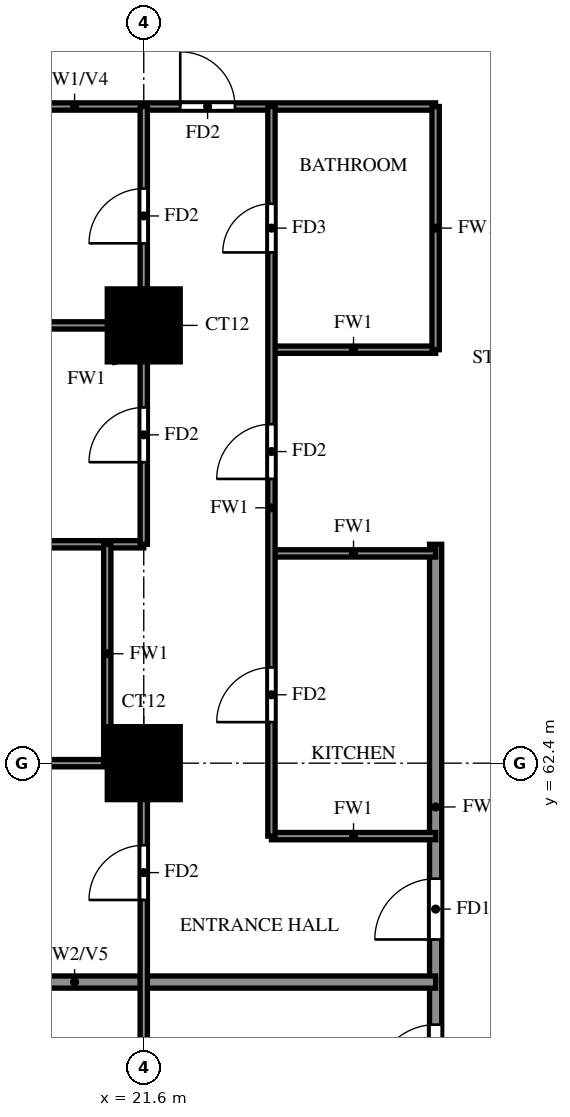
"""IFC4 building model, lengths in metres.
Left out: names, types, materials, properties, quantities, classifications, styles, units other than length and angle.
Written with IfcOpenShell. Run it as: python <this file> out.ifc"""

import sys

from ifc_helpers import new_model, si_unit, direction, frame, frame_2d, origin, origin_2d, place, context, subcontext, project, spatial, rectangle, extrude, source, transform, mapped, element, fill, save


model = new_model("IFC4")
c1 = context("Model", 3, precision=1e-05, world=origin(), true_north=direction((0.0, 1.0)))
c2 = subcontext(c1, "Body", "Model", "MODEL_VIEW")
j1 = project(units=[si_unit("LENGTHUNIT", "METRE"), si_unit("PLANEANGLEUNIT", "RADIAN")], contexts=[c1])
p1 = place(None, origin())
s1 = spatial("IfcSite", under=j1, at=p1, CompositionType="ELEMENT")
p2 = place(p1, origin())
s2 = spatial("IfcBuilding", under=s1, at=p2, CompositionType="ELEMENT")
p3 = place(p2, frame((0.0, 0.0, 93.5)))
s3 = spatial("IfcBuildingStorey", under=s2, at=p3, CompositionType="ELEMENT", Elevation=93.5)
m1 = source(origin(), c2, "Body", "SweptSolid", [
    extrude(rectangle(XDim=1.2, YDim=1.2, at=origin_2d()), origin(), (0.0, 0.0, 1.0), 3.18),
])
for number, where, z_axis, x_axis in (
    (1, (21.6, 62.4, 0.0), (0.0, 0.0, 1.0), (1.0, 0.0, 0.0)),
    (2, (21.6, 69.6, 0.0), (0.0, 0.0, 1.0), (1.0, 0.0, 0.0)),
):
    element("IfcColumn", number, at=place(p3, frame(where, z_axis=z_axis, x_axis=x_axis)), inside=s3, PredefinedType="COLUMN", context=c2, shape_type="MappedRepresentation", body=[
        mapped(m1, transform((0.0, 0.0, 0.0))),
    ])
p4 = place(p3, frame((26.4, 56.4, 0.0), z_axis=(0.0, 0.0, 1.0), x_axis=(0.0, 1.0, 0.0)))
e3 = element("IfcWall", 3, at=p4, inside=s3, PredefinedType="SOLIDWALL", context=c2, shape_type="SweptSolid", body=[
    extrude(rectangle(XDim=9.6, YDim=0.2, at=frame_2d((4.8, 0.0))), origin(), (0.0, 0.0, 1.0), 3.18),
])
p5 = place(p4, frame((0.7, 0.0, 0.0)))
e4 = element("IfcOpeningElement", 4, at=p5, cuts=e3, PredefinedType="OPENING", context=c2, shape_type="SweptSolid", body=[
    extrude(rectangle(XDim=1.0, YDim=2.1, at=frame_2d((0.5, 1.05))), frame((0.0, 0.11, 0.0), z_axis=(0.0, -1.0, 0.0), x_axis=(1.0, 0.0, 0.0)), (0.0, 0.0, 1.0), 0.22),
])
p6 = place(p4, frame((3.1, 0.0, 0.0)))
e5 = element("IfcOpeningElement", 5, at=p6, cuts=e3, PredefinedType="OPENING", context=c2, shape_type="SweptSolid", body=[
    extrude(rectangle(XDim=1.0, YDim=2.1, at=frame_2d((0.5, 1.05))), frame((0.0, 0.11, 0.0), z_axis=(0.0, -1.0, 0.0), x_axis=(1.0, 0.0, 0.0)), (0.0, 0.0, 1.0), 0.22),
])
p7 = place(p3, frame((14.525, 58.8, 0.0), z_axis=(0.0, 0.0, 1.0), x_axis=(1.0, 0.0, 0.0)))
e6 = element("IfcWall", 6, at=p7, inside=s3, PredefinedType="SOLIDWALL", context=c2, shape_type="SweptSolid", body=[
    extrude(rectangle(XDim=11.875, YDim=0.2, at=frame_2d((5.938, 0.0))), origin(), (0.0, 0.0, 1.0), 2.28),
])
p8 = place(p3, frame((23.7, 61.2, 0.0), z_axis=(0.0, 0.0, 1.0), x_axis=(1.0, 0.0, 0.0)))
e7 = element("IfcWall", 7, at=p8, inside=s3, PredefinedType="PARTITIONING", context=c2, shape_type="SweptSolid", body=[
    extrude(rectangle(XDim=2.7, YDim=0.12, at=frame_2d((1.35, 0.0))), origin(), (0.0, 0.0, 1.0), 3.18),
])
p9 = place(p3, frame((14.525, 62.4, 0.0), z_axis=(0.0, 0.0, 1.0), x_axis=(1.0, 0.0, 0.0)))
e8 = element("IfcWall", 8, at=p9, inside=s3, PredefinedType="PARTITIONING", context=c2, shape_type="SweptSolid", body=[
    extrude(rectangle(XDim=7.075, YDim=0.12, at=frame_2d((3.538, 0.0))), origin(), (0.0, 0.0, 1.0), 3.18),
])
p10 = place(p9, frame((2.837, 0.0, 0.0)))
e9 = element("IfcOpeningElement", 9, at=p10, cuts=e8, PredefinedType="OPENING", context=c2, shape_type="SweptSolid", body=[
    extrude(rectangle(XDim=0.8, YDim=2.1, at=frame_2d((0.4, 1.05))), frame((0.0, 0.07, 0.0), z_axis=(0.0, -1.0, 0.0), x_axis=(1.0, 0.0, 0.0)), (0.0, 0.0, 1.0), 0.14),
])
p11 = place(p3, frame((23.7, 65.85, 0.0), z_axis=(0.0, 0.0, 1.0), x_axis=(1.0, 0.0, 0.0)))
e10 = element("IfcWall", 10, at=p11, inside=s3, PredefinedType="PARTITIONING", context=c2, shape_type="SweptSolid", body=[
    extrude(rectangle(XDim=2.7, YDim=0.12, at=frame_2d((1.35, 0.0))), origin(), (0.0, 0.0, 1.0), 3.18),
])
p12 = place(p3, frame((14.525, 66.0, 0.0), z_axis=(0.0, 0.0, 1.0), x_axis=(1.0, 0.0, 0.0)))
e11 = element("IfcWall", 11, at=p12, inside=s3, PredefinedType="PARTITIONING", context=c2, shape_type="SweptSolid", body=[
    extrude(rectangle(XDim=7.075, YDim=0.12, at=frame_2d((3.538, 0.0))), origin(), (0.0, 0.0, 1.0), 2.28),
])
p13 = place(p3, frame((23.7, 69.2, 0.0), z_axis=(0.0, 0.0, 1.0), x_axis=(1.0, 0.0, 0.0)))
e12 = element("IfcWall", 12, at=p13, inside=s3, PredefinedType="PARTITIONING", context=c2, shape_type="SweptSolid", body=[
    extrude(rectangle(XDim=2.7, YDim=0.12, at=frame_2d((1.35, 0.0))), origin(), (0.0, 0.0, 1.0), 3.18),
])
p14 = place(p3, frame((14.525, 69.6, 0.0), z_axis=(0.0, 0.0, 1.0), x_axis=(1.0, 0.0, 0.0)))
e13 = element("IfcWall", 13, at=p14, inside=s3, PredefinedType="PARTITIONING", context=c2, shape_type="SweptSolid", body=[
    extrude(rectangle(XDim=7.075, YDim=0.12, at=frame_2d((3.538, 0.0))), origin(), (0.0, 0.0, 1.0), 3.18),
])
p15 = place(p3, frame((14.525, 73.2, 0.0), z_axis=(0.0, 0.0, 1.0), x_axis=(1.0, 0.0, 0.0)))
e14 = element("IfcWall", 14, at=p15, inside=s3, PredefinedType="PARTITIONING", context=c2, shape_type="SweptSolid", body=[
    extrude(rectangle(XDim=11.875, YDim=0.12, at=frame_2d((5.938, 0.0))), origin(), (0.0, 0.0, 1.0), 2.28),
])
p16 = place(p15, frame((7.675, 0.0, 0.0)))
e15 = element("IfcOpeningElement", 15, at=p16, cuts=e14, PredefinedType="OPENING", context=c2, shape_type="SweptSolid", body=[
    extrude(rectangle(XDim=0.9, YDim=2.1, at=frame_2d((0.45, 1.05))), frame((0.0, 0.07, 0.0), z_axis=(0.0, -1.0, 0.0), x_axis=(1.0, 0.0, 0.0)), (0.0, 0.0, 1.0), 0.14),
])
p17 = place(p3, frame((21.0, 62.4, 0.0), z_axis=(0.0, 0.0, 1.0), x_axis=(0.0, 1.0, 0.0)))
e16 = element("IfcWall", 16, at=p17, inside=s3, PredefinedType="PARTITIONING", context=c2, shape_type="SweptSolid", body=[
    extrude(rectangle(XDim=3.6, YDim=0.12, at=frame_2d((1.8, 0.0))), origin(), (0.0, 0.0, 1.0), 3.18),
])
p18 = place(p3, frame((21.6, 33.725, 0.0), z_axis=(0.0, 0.0, 1.0), x_axis=(0.0, 1.0, 0.0)))
e17 = element("IfcWall", 17, at=p18, inside=s3, PredefinedType="PARTITIONING", context=c2, shape_type="SweptSolid", body=[
    extrude(rectangle(XDim=28.675, YDim=0.12, at=frame_2d((14.337, 0.0))), origin(), (0.0, 0.0, 1.0), 3.18),
])
p19 = place(p18, frame((7.775, 0.0, 0.0)))
e18 = element("IfcOpeningElement", 18, at=p19, cuts=e17, PredefinedType="OPENING", context=c2, shape_type="SweptSolid", body=[
    extrude(rectangle(XDim=0.9, YDim=2.1, at=frame_2d((0.45, 1.05))), frame((0.0, 0.07, 0.0), z_axis=(0.0, -1.0, 0.0), x_axis=(1.0, 0.0, 0.0)), (0.0, 0.0, 1.0), 0.14),
])
p20 = place(p18, frame((17.125, 0.0, 0.0)))
e19 = element("IfcOpeningElement", 19, at=p20, cuts=e17, PredefinedType="OPENING", context=c2, shape_type="SweptSolid", body=[
    extrude(rectangle(XDim=1.5, YDim=2.1, at=frame_2d((0.75, 1.05))), frame((0.0, 0.07, 0.0), z_axis=(0.0, -1.0, 0.0), x_axis=(1.0, 0.0, 0.0)), (0.0, 0.0, 1.0), 0.14),
])
p21 = place(p18, frame((22.825, 0.0, 0.0)))
e20 = element("IfcOpeningElement", 20, at=p21, cuts=e17, PredefinedType="OPENING", context=c2, shape_type="SweptSolid", body=[
    extrude(rectangle(XDim=0.9, YDim=2.1, at=frame_2d((0.45, 1.05))), frame((0.0, 0.07, 0.0), z_axis=(0.0, -1.0, 0.0), x_axis=(1.0, 0.0, 0.0)), (0.0, 0.0, 1.0), 0.14),
])
p22 = place(p18, frame((26.425, 0.0, 0.0)))
e21 = element("IfcOpeningElement", 21, at=p22, cuts=e17, PredefinedType="OPENING", context=c2, shape_type="SweptSolid", body=[
    extrude(rectangle(XDim=0.9, YDim=2.1, at=frame_2d((0.45, 1.05))), frame((0.0, 0.07, 0.0), z_axis=(0.0, -1.0, 0.0), x_axis=(1.0, 0.0, 0.0)), (0.0, 0.0, 1.0), 0.14),
])
p23 = place(p3, frame((21.6, 66.0, 0.0), z_axis=(0.0, 0.0, 1.0), x_axis=(0.0, 1.0, 0.0)))
e22 = element("IfcWall", 22, at=p23, inside=s3, PredefinedType="PARTITIONING", context=c2, shape_type="SweptSolid", body=[
    extrude(rectangle(XDim=7.2, YDim=0.12, at=frame_2d((3.6, 0.0))), origin(), (0.0, 0.0, 1.0), 3.18),
])
p24 = place(p23, frame((1.35, 0.0, 0.0)))
e23 = element("IfcOpeningElement", 23, at=p24, cuts=e22, PredefinedType="OPENING", context=c2, shape_type="SweptSolid", body=[
    extrude(rectangle(XDim=0.9, YDim=2.1, at=frame_2d((0.45, 1.05))), frame((0.0, 0.07, 0.0), z_axis=(0.0, -1.0, 0.0), x_axis=(1.0, 0.0, 0.0)), (0.0, 0.0, 1.0), 0.14),
])
p25 = place(p23, frame((4.95, 0.0, 0.0)))
e24 = element("IfcOpeningElement", 24, at=p25, cuts=e22, PredefinedType="OPENING", context=c2, shape_type="SweptSolid", body=[
    extrude(rectangle(XDim=0.9, YDim=2.1, at=frame_2d((0.45, 1.05))), frame((0.0, 0.07, 0.0), z_axis=(0.0, -1.0, 0.0), x_axis=(1.0, 0.0, 0.0)), (0.0, 0.0, 1.0), 0.14),
])
p26 = place(p3, frame((23.7, 61.2, 0.0), z_axis=(0.0, 0.0, 1.0), x_axis=(0.0, 1.0, 0.0)))
e25 = element("IfcWall", 25, at=p26, inside=s3, PredefinedType="PARTITIONING", context=c2, shape_type="SweptSolid", body=[
    extrude(rectangle(XDim=12.0, YDim=0.12, at=frame_2d((6.0, 0.0))), origin(), (0.0, 0.0, 1.0), 3.18),
])
p27 = place(p26, frame((1.875, 0.0, 0.0)))
e26 = element("IfcOpeningElement", 26, at=p27, cuts=e25, PredefinedType="OPENING", context=c2, shape_type="SweptSolid", body=[
    extrude(rectangle(XDim=0.9, YDim=2.1, at=frame_2d((0.45, 1.05))), frame((0.0, 0.07, 0.0), z_axis=(0.0, -1.0, 0.0), x_axis=(1.0, 0.0, 0.0)), (0.0, 0.0, 1.0), 0.14),
])
p28 = place(p26, frame((5.875, 0.0, 0.0)))
e27 = element("IfcOpeningElement", 27, at=p28, cuts=e25, PredefinedType="OPENING", context=c2, shape_type="SweptSolid", body=[
    extrude(rectangle(XDim=0.9, YDim=2.1, at=frame_2d((0.45, 1.05))), frame((0.0, 0.07, 0.0), z_axis=(0.0, -1.0, 0.0), x_axis=(1.0, 0.0, 0.0)), (0.0, 0.0, 1.0), 0.14),
])
p29 = place(p26, frame((9.6, 0.0, 0.0)))
e28 = element("IfcOpeningElement", 28, at=p29, cuts=e25, PredefinedType="OPENING", context=c2, shape_type="SweptSolid", body=[
    extrude(rectangle(XDim=0.8, YDim=2.1, at=frame_2d((0.4, 1.05))), frame((0.0, 0.07, 0.0), z_axis=(0.0, -1.0, 0.0), x_axis=(1.0, 0.0, 0.0)), (0.0, 0.0, 1.0), 0.14),
])
p30 = place(p3, frame((26.4, 69.2, 0.0), z_axis=(0.0, 0.0, 1.0), x_axis=(0.0, 1.0, 0.0)))
e29 = element("IfcWall", 29, at=p30, inside=s3, PredefinedType="PARTITIONING", context=c2, shape_type="SweptSolid", body=[
    extrude(rectangle(XDim=4.0, YDim=0.12, at=frame_2d((2.0, 0.0))), origin(), (0.0, 0.0, 1.0), 3.18),
])
p31 = place(p5, origin())
e30 = element("IfcDoor", 30, at=p31, inside=s3, OperationType="SINGLE_SWING_LEFT", PredefinedType="DOOR", context=c2, shape_type="SweptSolid", body=[
    extrude(rectangle(XDim=1.0, YDim=2.1, at=frame_2d((0.5, 1.05))), frame((0.0, 0.025, 0.0), z_axis=(0.0, -1.0, 0.0), x_axis=(1.0, 0.0, 0.0)), (0.0, 0.0, 1.0), 0.05),
])
fill(e4, e30)
p32 = place(p6, origin())
e31 = element("IfcDoor", 31, at=p32, inside=s3, OperationType="SINGLE_SWING_LEFT", PredefinedType="DOOR", context=c2, shape_type="SweptSolid", body=[
    extrude(rectangle(XDim=1.0, YDim=2.1, at=frame_2d((0.5, 1.05))), frame((0.0, 0.025, 0.0), z_axis=(0.0, -1.0, 0.0), x_axis=(1.0, 0.0, 0.0)), (0.0, 0.0, 1.0), 0.05),
])
fill(e5, e31)
p33 = place(p22, origin())
e32 = element("IfcDoor", 32, at=p33, inside=s3, OperationType="SINGLE_SWING_LEFT", PredefinedType="DOOR", context=c2, shape_type="SweptSolid", body=[
    extrude(rectangle(XDim=0.9, YDim=2.1, at=frame_2d((0.45, 1.05))), frame((0.0, 0.025, 0.0), z_axis=(0.0, -1.0, 0.0), x_axis=(1.0, 0.0, 0.0)), (0.0, 0.0, 1.0), 0.05),
])
fill(e21, e32)
p34 = place(p24, origin())
e33 = element("IfcDoor", 33, at=p34, inside=s3, OperationType="SINGLE_SWING_LEFT", PredefinedType="DOOR", context=c2, shape_type="SweptSolid", body=[
    extrude(rectangle(XDim=0.9, YDim=2.1, at=frame_2d((0.45, 1.05))), frame((0.0, 0.025, 0.0), z_axis=(0.0, -1.0, 0.0), x_axis=(1.0, 0.0, 0.0)), (0.0, 0.0, 1.0), 0.05),
])
fill(e23, e33)
p35 = place(p25, origin())
e34 = element("IfcDoor", 34, at=p35, inside=s3, OperationType="SINGLE_SWING_LEFT", PredefinedType="DOOR", context=c2, shape_type="SweptSolid", body=[
    extrude(rectangle(XDim=0.9, YDim=2.1, at=frame_2d((0.45, 1.05))), frame((0.0, 0.025, 0.0), z_axis=(0.0, -1.0, 0.0), x_axis=(1.0, 0.0, 0.0)), (0.0, 0.0, 1.0), 0.05),
])
fill(e24, e34)
p36 = place(p16, origin())
e35 = element("IfcDoor", 35, at=p36, inside=s3, OperationType="SINGLE_SWING_RIGHT", PredefinedType="DOOR", context=c2, shape_type="SweptSolid", body=[
    extrude(rectangle(XDim=0.9, YDim=2.1, at=frame_2d((0.45, 1.05))), frame((0.0, 0.025, 0.0), z_axis=(0.0, -1.0, 0.0), x_axis=(1.0, 0.0, 0.0)), (0.0, 0.0, 1.0), 0.05),
])
fill(e15, e35)
p37 = place(p27, origin())
e36 = element("IfcDoor", 36, at=p37, inside=s3, OperationType="SINGLE_SWING_LEFT", PredefinedType="DOOR", context=c2, shape_type="SweptSolid", body=[
    extrude(rectangle(XDim=0.9, YDim=2.1, at=frame_2d((0.45, 1.05))), frame((0.0, 0.025, 0.0), z_axis=(0.0, -1.0, 0.0), x_axis=(1.0, 0.0, 0.0)), (0.0, 0.0, 1.0), 0.05),
])
fill(e26, e36)
p38 = place(p28, origin())
e37 = element("IfcDoor", 37, at=p38, inside=s3, OperationType="SINGLE_SWING_LEFT", PredefinedType="DOOR", context=c2, shape_type="SweptSolid", body=[
    extrude(rectangle(XDim=0.9, YDim=2.1, at=frame_2d((0.45, 1.05))), frame((0.0, 0.025, 0.0), z_axis=(0.0, -1.0, 0.0), x_axis=(1.0, 0.0, 0.0)), (0.0, 0.0, 1.0), 0.05),
])
fill(e27, e37)
p39 = place(p29, origin())
e38 = element("IfcDoor", 38, at=p39, inside=s3, OperationType="SINGLE_SWING_RIGHT", PredefinedType="DOOR", context=c2, shape_type="SweptSolid", body=[
    extrude(rectangle(XDim=0.8, YDim=2.1, at=frame_2d((0.4, 1.05))), frame((0.0, 0.025, 0.0), z_axis=(0.0, -1.0, 0.0), x_axis=(1.0, 0.0, 0.0)), (0.0, 0.0, 1.0), 0.05),
])
fill(e28, e38)
save(model, sys.argv[1])
